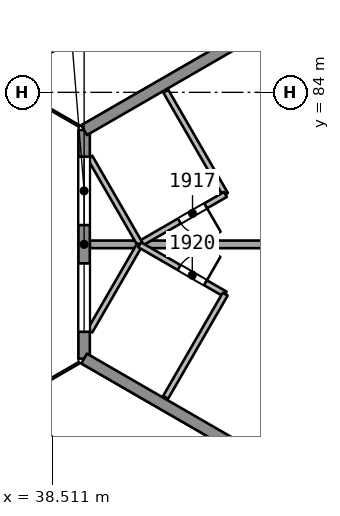
"""IFC4 building model, lengths in metres.
Left out: names, types, materials, properties, quantities, classifications, styles, units other than length and angle.
Written with IfcOpenShell. Run it as: python <this file> out.ifc"""

import sys

from ifc_helpers import new_model, si_unit, direction, frame, frame_2d, origin, place, context, subcontext, project, spatial, rectangle, extrude, element, fill, save


model = new_model("IFC4")
c1 = context("Model", 3, precision=1e-05, world=origin(), true_north=direction((0.0, 1.0)))
c2 = subcontext(c1, "Body", "Model", "MODEL_VIEW")
j1 = project(units=[si_unit("LENGTHUNIT", "METRE"), si_unit("PLANEANGLEUNIT", "RADIAN")], contexts=[c1])
p1 = place(None, origin())
s1 = spatial("IfcSite", under=j1, at=p1, CompositionType="ELEMENT")
p2 = place(p1, origin())
s2 = spatial("IfcBuilding", under=s1, at=p2, CompositionType="ELEMENT")
p3 = place(p2, frame((0.0, 0.0, 83.2)))
s3 = spatial("IfcBuildingStorey", under=s2, at=p3, CompositionType="ELEMENT", Elevation=83.2)
p4 = place(p3, frame((41.504, 84.028, 0.0), z_axis=(0.0, 0.0, 1.0), x_axis=(0.499967424082, -0.866044210682, 0.0)))
e1 = element("IfcWall", 1, at=p4, inside=s3, PredefinedType="PARTITIONING", context=c2, shape_type="SweptSolid", body=[
    extrude(rectangle(XDim=3.135, YDim=0.15, at=frame_2d((1.567, 0.0))), origin(), (0.0, 0.0, 1.0), 3.2),
])
p5 = place(p3, frame((43.072, 81.313, 0.0), z_axis=(0.0, 0.0, 1.0), x_axis=(-0.866021400173, -0.500006934395, 0.0)))
e2 = element("IfcWall", 2, at=p5, inside=s3, PredefinedType="PARTITIONING", context=c2, shape_type="SweptSolid", body=[
    extrude(rectangle(XDim=2.6, YDim=0.15, at=frame_2d((1.3, 0.0))), origin(), (0.0, 0.0, 1.0), 3.2),
])
p6 = place(p5, frame((0.6, 0.0, 0.0)))
e3 = element("IfcOpeningElement", 3, at=p6, cuts=e2, PredefinedType="OPENING", context=c2, shape_type="SweptSolid", body=[
    extrude(rectangle(XDim=0.8, YDim=2.1, at=frame_2d((0.4, 1.05))), frame((0.0, 0.085, 0.0), z_axis=(0.0, -1.0, 0.0), x_axis=(1.0, 0.0, 0.0)), (0.0, 0.0, 1.0), 0.171),
])
p7 = place(p3, frame((40.82, 80.013, 0.0), z_axis=(0.0, 0.0, 1.0), x_axis=(-0.499995114243, 0.866028224559, 0.0)))
e4 = element("IfcWall", 4, at=p7, inside=s3, PredefinedType="PARTITIONING", context=c2, shape_type="SweptSolid", body=[
    extrude(rectangle(XDim=2.635, YDim=0.15, at=frame_2d((1.318, 0.0))), origin(), (0.0, 0.0, 1.0), 3.2),
])
p8 = place(p3, frame((39.502, 80.0, 0.0), z_axis=(0.0, 0.0, 1.0), x_axis=(1.0, 0.0, 0.0)))
e5 = element("IfcWall", 5, at=p8, inside=s3, PredefinedType="PARTITIONING", context=c2, shape_type="SweptSolid", body=[
    extrude(rectangle(XDim=8.696, YDim=0.2, at=frame_2d((4.348, 0.0))), origin(), (0.0, 0.0, 1.0), 3.2),
])
p9 = place(p3, frame((39.502, 77.718, 0.0), z_axis=(0.0, 0.0, 1.0), x_axis=(0.499972156837, 0.866041478445, 0.0)))
e6 = element("IfcWall", 6, at=p9, inside=s3, PredefinedType="PARTITIONING", context=c2, shape_type="SweptSolid", body=[
    extrude(rectangle(XDim=2.624, YDim=0.15, at=frame_2d((1.312, 0.0))), origin(), (0.0, 0.0, 1.0), 3.2),
])
p10 = place(p3, frame((40.814, 79.99, 0.0), z_axis=(0.0, 0.0, 1.0), x_axis=(0.866062058628, -0.499936506574, 0.0)))
e7 = element("IfcWall", 7, at=p10, inside=s3, PredefinedType="PARTITIONING", context=c2, shape_type="SweptSolid", body=[
    extrude(rectangle(XDim=2.6, YDim=0.15, at=frame_2d((1.3, 0.0))), origin(), (0.0, 0.0, 1.0), 3.2),
])
p11 = place(p10, frame((1.2, 0.0, 0.0)))
e8 = element("IfcOpeningElement", 8, at=p11, cuts=e7, PredefinedType="OPENING", context=c2, shape_type="SweptSolid", body=[
    extrude(rectangle(XDim=0.8, YDim=2.1, at=frame_2d((0.4, 1.05))), frame((0.0, 0.085, 0.0), z_axis=(0.0, -1.0, 0.0), x_axis=(1.0, 0.0, 0.0)), (0.0, 0.0, 1.0), 0.171),
])
p12 = place(p3, frame((43.066, 78.69, 0.0), z_axis=(0.0, 0.0, 1.0), x_axis=(-0.499967424082, -0.866044210682, 0.0)))
e9 = element("IfcWall", 9, at=p12, inside=s3, PredefinedType="PARTITIONING", context=c2, shape_type="SweptSolid", body=[
    extrude(rectangle(XDim=3.135, YDim=0.15, at=frame_2d((1.567, 0.0))), origin(), (0.0, 0.0, 1.0), 3.2),
])
p13 = place(p3, frame((39.353, 76.995, 0.0), z_axis=(0.0, 0.0, 1.0), x_axis=(0.0, 1.0, 0.0)))
e10 = element("IfcWall", 10, at=p13, inside=s3, PredefinedType="SOLIDWALL", context=c2, shape_type="SweptSolid", body=[
    extrude(rectangle(XDim=6.01, YDim=0.3, at=frame_2d((3.005, 0.0))), origin(), (0.0, 0.0, 1.0), 3.2),
])
p14 = place(p13, frame((3.512, 0.0, 0.9)))
e11 = element("IfcOpeningElement", 11, at=p14, cuts=e10, PredefinedType="OPENING", context=c2, shape_type="SweptSolid", body=[
    extrude(rectangle(XDim=1.8, YDim=1.5, at=frame_2d((0.9, 0.75))), frame((0.0, 0.161, 0.0), z_axis=(0.0, -1.0, 0.0), x_axis=(1.0, 0.0, 0.0)), (0.0, 0.0, 1.0), 0.321),
])
p15 = place(p13, frame((0.705, 0.0, 0.9)))
e12 = element("IfcOpeningElement", 12, at=p15, cuts=e10, PredefinedType="OPENING", context=c2, shape_type="SweptSolid", body=[
    extrude(rectangle(XDim=1.8, YDim=1.5, at=frame_2d((0.9, 0.75))), frame((0.0, 0.161, 0.0), z_axis=(0.0, -1.0, 0.0), x_axis=(1.0, 0.0, 0.0)), (0.0, 0.0, 1.0), 0.321),
])
p16 = place(p3, frame((39.353, 83.005, 0.0), z_axis=(0.0, 0.0, 1.0), x_axis=(0.866025832118, 0.499999258104, 0.0)))
e13 = element("IfcWall", 13, at=p16, inside=s3, PredefinedType="SOLIDWALL", context=c2, shape_type="SweptSolid", body=[
    extrude(rectangle(XDim=58.737, YDim=0.3, at=frame_2d((29.368, 0.0))), origin(), (0.0, 0.0, 1.0), 3.2),
])
p17 = place(p16, frame((28.636, 0.0, 0.0)))
e14 = element("IfcOpeningElement", 14, at=p17, cuts=e13, PredefinedType="OPENING", context=c2, shape_type="SweptSolid", body=[
    extrude(rectangle(XDim=2.4, YDim=2.4, at=frame_2d((1.2, 1.2))), frame((0.0, 0.161, 0.0), z_axis=(0.0, -1.0, 0.0), x_axis=(1.0, 0.0, 0.0)), (0.0, 0.0, 1.0), 0.321),
])
p18 = place(p16, frame((33.936, 0.0, 0.0)))
e15 = element("IfcOpeningElement", 15, at=p18, cuts=e13, PredefinedType="OPENING", context=c2, shape_type="SweptSolid", body=[
    extrude(rectangle(XDim=2.4, YDim=2.4, at=frame_2d((1.2, 1.2))), frame((0.0, 0.161, 0.0), z_axis=(0.0, -1.0, 0.0), x_axis=(1.0, 0.0, 0.0)), (0.0, 0.0, 1.0), 0.321),
])
p19 = place(p16, frame((45.575, 0.0, 0.0)))
e16 = element("IfcOpeningElement", 16, at=p19, cuts=e13, PredefinedType="OPENING", context=c2, shape_type="SweptSolid", body=[
    extrude(rectangle(XDim=2.4, YDim=2.4, at=frame_2d((1.2, 1.2))), frame((0.0, 0.161, 0.0), z_axis=(0.0, -1.0, 0.0), x_axis=(1.0, 0.0, 0.0)), (0.0, 0.0, 1.0), 0.321),
])
p20 = place(p16, frame((22.868, 0.0, 0.0)))
e17 = element("IfcOpeningElement", 17, at=p20, cuts=e13, PredefinedType="OPENING", context=c2, shape_type="SweptSolid", body=[
    extrude(rectangle(XDim=2.4, YDim=2.4, at=frame_2d((1.2, 1.2))), frame((0.0, 0.161, 0.0), z_axis=(0.0, -1.0, 0.0), x_axis=(1.0, 0.0, 0.0)), (0.0, 0.0, 1.0), 0.321),
])
p21 = place(p16, frame((10.765, 0.0, 0.0)))
e18 = element("IfcOpeningElement", 18, at=p21, cuts=e13, PredefinedType="OPENING", context=c2, shape_type="SweptSolid", body=[
    extrude(rectangle(XDim=2.4, YDim=2.4, at=frame_2d((1.2, 1.2))), frame((0.0, 0.161, 0.0), z_axis=(0.0, -1.0, 0.0), x_axis=(1.0, 0.0, 0.0)), (0.0, 0.0, 1.0), 0.321),
])
p22 = place(p3, frame((90.221, 47.626, 0.0), z_axis=(0.0, 0.0, 1.0), x_axis=(-0.866025832118, 0.499999258104, 0.0)))
e19 = element("IfcWall", 19, at=p22, inside=s3, PredefinedType="SOLIDWALL", context=c2, shape_type="SweptSolid", body=[
    extrude(rectangle(XDim=58.737, YDim=0.3, at=frame_2d((29.368, 0.0))), origin(), (0.0, 0.0, 1.0), 3.2),
])
p23 = place(p22, frame((32.065, 0.0, 0.0)))
e20 = element("IfcOpeningElement", 20, at=p23, cuts=e19, PredefinedType="OPENING", context=c2, shape_type="SweptSolid", body=[
    extrude(rectangle(XDim=2.4, YDim=2.4, at=frame_2d((1.2, 1.2))), frame((0.0, 0.161, 0.0), z_axis=(0.0, -1.0, 0.0), x_axis=(1.0, 0.0, 0.0)), (0.0, 0.0, 1.0), 0.321),
])
p24 = place(p22, frame((45.575, 0.0, 0.0)))
e21 = element("IfcOpeningElement", 21, at=p24, cuts=e19, PredefinedType="OPENING", context=c2, shape_type="SweptSolid", body=[
    extrude(rectangle(XDim=2.4, YDim=2.4, at=frame_2d((1.2, 1.2))), frame((0.0, 0.161, 0.0), z_axis=(0.0, -1.0, 0.0), x_axis=(1.0, 0.0, 0.0)), (0.0, 0.0, 1.0), 0.321),
])
p25 = place(p22, frame((13.441, 0.0, 0.0)))
e22 = element("IfcOpeningElement", 22, at=p25, cuts=e19, PredefinedType="OPENING", context=c2, shape_type="SweptSolid", body=[
    extrude(rectangle(XDim=2.4, YDim=2.4, at=frame_2d((1.2, 1.2))), frame((0.0, 0.161, 0.0), z_axis=(0.0, -1.0, 0.0), x_axis=(1.0, 0.0, 0.0)), (0.0, 0.0, 1.0), 0.321),
])
p26 = place(p6, origin())
e23 = element("IfcDoor", 23, at=p26, inside=s3, OperationType="SINGLE_SWING_LEFT", PredefinedType="NOTDEFINED", context=c2, shape_type="SweptSolid", body=[
    extrude(rectangle(XDim=0.8, YDim=2.1, at=frame_2d((0.4, 1.05))), frame((0.0, 0.025, 0.0), z_axis=(0.0, -1.0, 0.0), x_axis=(1.0, 0.0, 0.0)), (0.0, 0.0, 1.0), 0.05),
])
fill(e3, e23)
p27 = place(p11, origin())
e24 = element("IfcDoor", 24, at=p27, inside=s3, OperationType="SINGLE_SWING_RIGHT", PredefinedType="NOTDEFINED", context=c2, shape_type="SweptSolid", body=[
    extrude(rectangle(XDim=0.8, YDim=2.1, at=frame_2d((0.4, 1.05))), frame((0.0, 0.025, 0.0), z_axis=(0.0, -1.0, 0.0), x_axis=(1.0, 0.0, 0.0)), (0.0, 0.0, 1.0), 0.05),
])
fill(e8, e24)
p28 = place(p14, origin())
e25 = element("IfcWindow", 25, at=p28, inside=s3, PartitioningType="SINGLE_PANEL", PredefinedType="WINDOW", context=c2, shape_type="SweptSolid", body=[
    extrude(rectangle(XDim=1.8, YDim=1.5, at=frame_2d((0.9, 0.75))), frame((0.0, 0.03, 0.0), z_axis=(0.0, -1.0, 0.0), x_axis=(1.0, 0.0, 0.0)), (0.0, 0.0, 1.0), 0.06),
])
fill(e11, e25)
p29 = place(p15, origin())
e26 = element("IfcWindow", 26, at=p29, inside=s3, PartitioningType="SINGLE_PANEL", PredefinedType="WINDOW", context=c2, shape_type="SweptSolid", body=[
    extrude(rectangle(XDim=1.8, YDim=1.5, at=frame_2d((0.9, 0.75))), frame((0.0, 0.03, 0.0), z_axis=(0.0, -1.0, 0.0), x_axis=(1.0, 0.0, 0.0)), (0.0, 0.0, 1.0), 0.06),
])
fill(e12, e26)
save(model, sys.argv[1])
